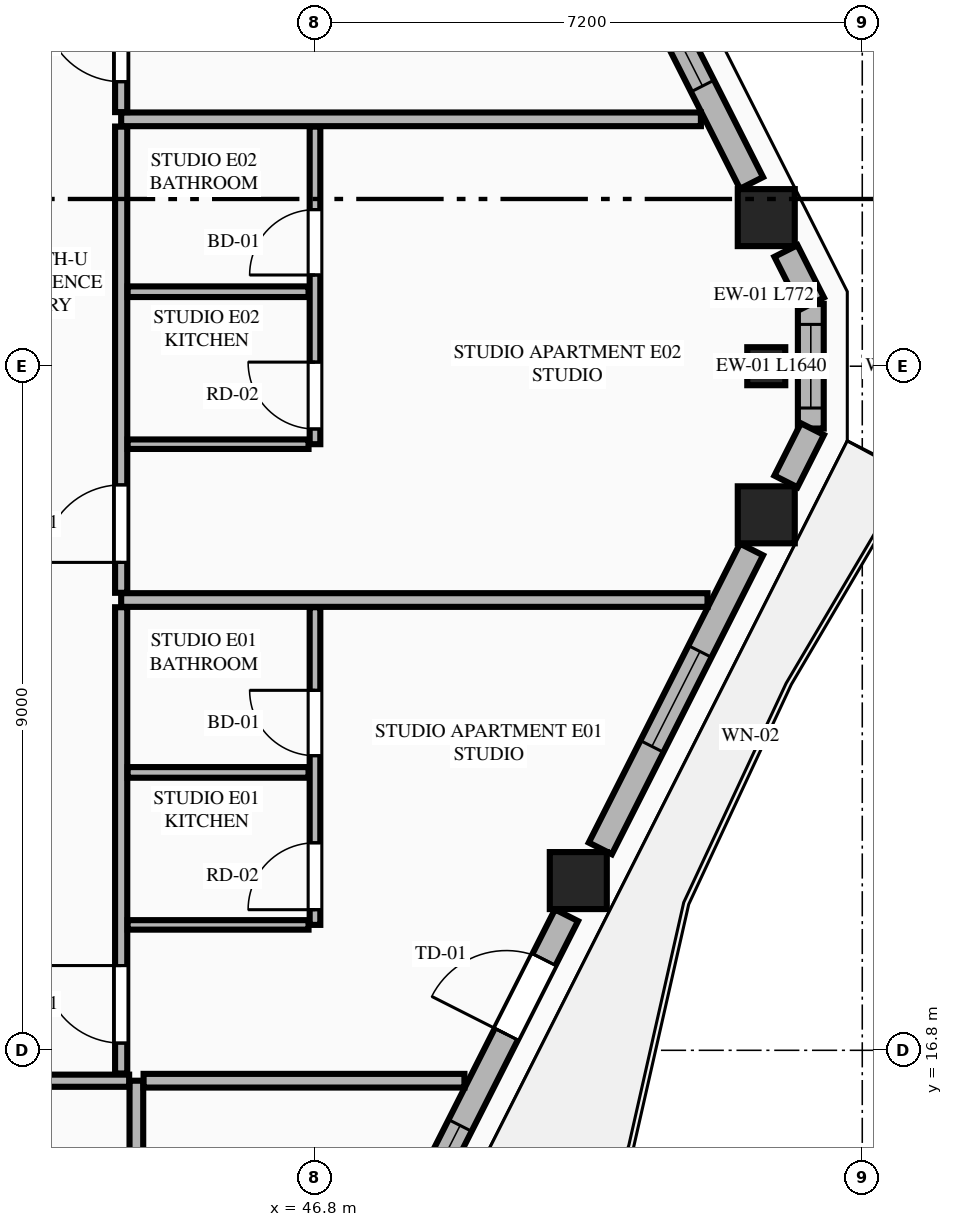
"""IFC4 building model, lengths in metres.
Left out: names, types, materials, properties, quantities, classifications, styles, units other than length and angle.
Written with IfcOpenShell. Run it as: python <this file> out.ifc"""

import sys

from ifc_helpers import new_model, si_unit, direction, frame, frame_2d, origin, origin_2d, place, context, subcontext, project, spatial, rectangle, extrude, element, fill, save


model = new_model("IFC4")
c1 = context("Model", 3, precision=1e-05, world=origin(), true_north=direction((0.0, 1.0)))
c2 = subcontext(c1, "Body", "Model", "MODEL_VIEW")
j1 = project(units=[si_unit("LENGTHUNIT", "METRE"), si_unit("PLANEANGLEUNIT", "RADIAN")], contexts=[c1])
p1 = place(None, origin())
s1 = spatial("IfcSite", under=j1, at=p1, CompositionType="ELEMENT")
p2 = place(p1, origin())
s2 = spatial("IfcBuilding", under=s1, at=p2, CompositionType="ELEMENT")
p3 = place(p2, frame((0.0, 0.0, 248.9)))
s3 = spatial("IfcBuildingStorey", under=s2, at=p3, CompositionType="ELEMENT", Elevation=248.9)
for number, where, z_axis, x_axis in (
    (1, (50.264, 19.033, 0.0), (0.0, 0.0, 1.0), (1.0, 0.0, 0.0)),
    (2, (52.737, 23.845, 0.0), (0.0, 0.0, 1.0), (1.0, 0.0, 0.0)),
    (3, (52.737, 27.755, 0.0), (0.0, 0.0, 1.0), (1.0, 0.0, 0.0)),
):
    element("IfcColumn", number, at=place(p3, frame(where, z_axis=z_axis, x_axis=x_axis)), inside=s3, PredefinedType="COLUMN", context=c2, shape_type="SweptSolid", body=[
        extrude(rectangle(XDim=0.75, YDim=0.75, at=origin_2d()), origin(), (0.0, 0.0, 1.0), 3.65),
    ])
p4 = place(p3, frame((52.737, 25.8, 0.0), z_axis=(0.0, 0.0, 1.0), x_axis=(0.0, 1.0, 0.0)))
e4 = element("IfcColumn", 4, at=p4, inside=s3, PredefinedType="PILASTER", context=c2, shape_type="SweptSolid", body=[
    extrude(rectangle(XDim=0.5, YDim=0.35, at=origin_2d()), origin(), (0.0, 0.0, 1.0), 3.65),
])
p5 = place(p3, frame((53.323, 24.98, 0.0), z_axis=(0.0, 0.0, 1.0), x_axis=(0.0, 1.0, 0.0)))
e5 = element("IfcWall", 5, at=p5, inside=s3, PredefinedType="STANDARD", context=c2, shape_type="SweptSolid", body=[
    extrude(rectangle(XDim=1.64, YDim=0.34, at=frame_2d((0.82, 0.0))), origin(), (0.0, 0.0, 1.0), 3.45),
])
p6 = place(p5, frame((0.27, 0.0, 0.75)))
e6 = element("IfcOpeningElement", 6, at=p6, cuts=e5, PredefinedType="OPENING", context=c2, shape_type="SweptSolid", body=[
    extrude(rectangle(XDim=1.1, YDim=2.0, at=frame_2d((0.55, 1.0))), frame((0.0, 0.18, 0.0), z_axis=(0.0, -1.0, 0.0), x_axis=(1.0, 0.0, 0.0)), (0.0, 0.0, 1.0), 0.36),
])
p7 = place(p3, frame((48.032, 14.473, 0.0), z_axis=(0.0, 0.0, 1.0), x_axis=(0.451539564999, 0.892251097641, 0.0)))
e7 = element("IfcWall", 7, at=p7, inside=s3, PredefinedType="STANDARD", context=c2, shape_type="SweptSolid", body=[
    extrude(rectangle(XDim=4.6, YDim=0.34, at=frame_2d((2.3, 0.0))), origin(), (0.0, 0.0, 1.0), 2.983),
])
p8 = place(p7, frame((2.846, 0.0, 0.0)))
e8 = element("IfcOpeningElement", 8, at=p8, cuts=e7, PredefinedType="OPENING", context=c2, shape_type="SweptSolid", body=[
    extrude(rectangle(XDim=1.1, YDim=2.25, at=frame_2d((0.55, 1.125))), frame((0.0, 0.18, 0.0), z_axis=(0.0, -1.0, 0.0), x_axis=(1.0, 0.0, 0.0)), (0.0, 0.0, 1.0), 0.36),
])
p9 = place(p7, frame((0.4, 0.0, 0.75)))
e9 = element("IfcOpeningElement", 9, at=p9, cuts=e7, PredefinedType="OPENING", context=c2, shape_type="SweptSolid", body=[
    extrude(rectangle(XDim=1.1, YDim=2.0, at=frame_2d((0.55, 1.0))), frame((0.0, 0.18, 0.0), z_axis=(0.0, -1.0, 0.0), x_axis=(1.0, 0.0, 0.0)), (0.0, 0.0, 1.0), 0.36),
])
p10 = place(p3, frame((50.554, 19.456, 0.0), z_axis=(0.0, 0.0, 1.0), x_axis=(0.45130817501, 0.892368158984, 0.0)))
e10 = element("IfcWall", 10, at=p10, inside=s3, PredefinedType="STANDARD", context=c2, shape_type="SweptSolid", body=[
    extrude(rectangle(XDim=4.407, YDim=0.34, at=frame_2d((2.204, 0.0))), origin(), (0.0, 0.0, 1.0), 2.983),
])
p11 = place(p10, frame((1.504, 0.0, 0.75)))
e11 = element("IfcOpeningElement", 11, at=p11, cuts=e10, PredefinedType="OPENING", context=c2, shape_type="SweptSolid", body=[
    extrude(rectangle(XDim=1.4, YDim=2.05, at=frame_2d((0.7, 1.025))), frame((0.0, 0.18, 0.0), z_axis=(0.0, -1.0, 0.0), x_axis=(1.0, 0.0, 0.0)), (0.0, 0.0, 1.0), 0.36),
])
for number, where, z_axis, x_axis in (
    (12, (52.996, 24.284, 0.0), (0.0, 0.0, 1.0), (0.451, 0.893, 0.0)),
    (13, (53.344, 26.627, 0.0), (0.0, 0.0, 1.0), (-0.451, 0.893, 0.0)),
):
    element("IfcWall", number, at=place(p3, frame(where, z_axis=z_axis, x_axis=x_axis)), inside=s3, PredefinedType="STANDARD", context=c2, shape_type="SweptSolid", body=[
        extrude(rectangle(XDim=0.772, YDim=0.34, at=frame_2d((0.386, 0.0))), origin(), (0.0, 0.0, 1.0), 3.45),
    ])
p12 = place(p3, frame((52.543, 28.211, 0.0), z_axis=(0.0, 0.0, 1.0), x_axis=(-0.451285866323, 0.892379441077, 0.0)))
e14 = element("IfcWall", 14, at=p12, inside=s3, PredefinedType="STANDARD", context=c2, shape_type="SweptSolid", body=[
    extrude(rectangle(XDim=4.407, YDim=0.34, at=frame_2d((2.204, 0.0))), origin(), (0.0, 0.0, 1.0), 2.983),
])
p13 = place(p12, frame((1.429, 0.0, 0.75)))
e15 = element("IfcOpeningElement", 15, at=p13, cuts=e14, PredefinedType="OPENING", context=c2, shape_type="SweptSolid", body=[
    extrude(rectangle(XDim=1.55, YDim=2.05, at=frame_2d((0.775, 1.025))), frame((0.0, 0.18, 0.0), z_axis=(0.0, -1.0, 0.0), x_axis=(1.0, 0.0, 0.0)), (0.0, 0.0, 1.0), 0.36),
])
p14 = place(p3, frame((44.45, 8.119, 0.0), z_axis=(0.0, 0.0, 1.0), x_axis=(0.0, 1.0, 0.0)))
e16 = element("IfcWall", 16, at=p14, inside=s3, PredefinedType="PARTITIONING", context=c2, shape_type="SweptSolid", body=[
    extrude(rectangle(XDim=8.281, YDim=0.18, at=frame_2d((4.141, 0.0))), origin(), (0.0, 0.0, 1.0), 3.45),
])
p15 = place(p3, frame((20.445, 16.4, 0.0), z_axis=(0.0, 0.0, 1.0), x_axis=(1.0, 0.0, 0.0)))
e17 = element("IfcWall", 17, at=p15, inside=s3, PredefinedType="PARTITIONING", context=c2, shape_type="SweptSolid", body=[
    extrude(rectangle(XDim=23.91, YDim=0.16, at=frame_2d((11.955, 0.0))), origin(), (0.0, 0.0, 1.0), 3.45),
])
p16 = place(p15, frame((0.705, 0.0, 0.0)))
e18 = element("IfcOpeningElement", 18, at=p16, cuts=e17, PredefinedType="OPENING", context=c2, shape_type="SweptSolid", body=[
    extrude(rectangle(XDim=1.35, YDim=2.35, at=frame_2d((0.675, 1.175))), frame((0.0, 0.09, 0.0), z_axis=(0.0, -1.0, 0.0), x_axis=(1.0, 0.0, 0.0)), (0.0, 0.0, 1.0), 0.18),
])
p17 = place(p3, frame((44.545, 16.4, 0.0), z_axis=(0.0, 0.0, 1.0), x_axis=(1.0, 0.0, 0.0)))
e19 = element("IfcWall", 19, at=p17, inside=s3, PredefinedType="PARTITIONING", context=c2, shape_type="SweptSolid", body=[
    extrude(rectangle(XDim=4.221, YDim=0.18, at=frame_2d((2.111, 0.0))), origin(), (0.0, 0.0, 1.0), 3.45),
])
p18 = place(p3, frame((44.25, 16.495, 0.0), z_axis=(0.0, 0.0, 1.0), x_axis=(0.0, 1.0, 0.0)))
e20 = element("IfcWall", 20, at=p18, inside=s3, PredefinedType="PARTITIONING", context=c2, shape_type="SweptSolid", body=[
    extrude(rectangle(XDim=6.134, YDim=0.16, at=frame_2d((3.067, 0.0))), origin(), (0.0, 0.0, 1.0), 3.137),
])
p19 = place(p18, frame((0.4, 0.0, 0.0)))
e21 = element("IfcOpeningElement", 21, at=p19, cuts=e20, PredefinedType="OPENING", context=c2, shape_type="SweptSolid", body=[
    extrude(rectangle(XDim=1.02, YDim=2.25, at=frame_2d((0.51, 1.125))), frame((0.0, 0.09, 0.0), z_axis=(0.0, -1.0, 0.0), x_axis=(1.0, 0.0, 0.0)), (0.0, 0.0, 1.0), 0.18),
])
p20 = place(p3, frame((44.335, 18.45, 0.0), z_axis=(0.0, 0.0, 1.0), x_axis=(1.0, 0.0, 0.0)))
e22 = element("IfcWall", 22, at=p20, inside=s3, PredefinedType="PARTITIONING", context=c2, shape_type="SweptSolid", body=[
    extrude(rectangle(XDim=2.38, YDim=0.125, at=frame_2d((1.19, 0.0))), origin(), (0.0, 0.0, 1.0), 3.45),
])
p21 = place(p3, frame((46.8, 18.45, 0.0), z_axis=(0.0, 0.0, 1.0), x_axis=(0.0, 1.0, 0.0)))
e23 = element("IfcWall", 23, at=p21, inside=s3, PredefinedType="PLUMBINGWALL", context=c2, shape_type="SweptSolid", body=[
    extrude(rectangle(XDim=4.179, YDim=0.14, at=frame_2d((2.089, 0.0))), origin(), (0.0, 0.0, 1.0), 3.45),
])
p22 = place(p21, frame((2.226, 0.0, 0.0)))
e24 = element("IfcOpeningElement", 24, at=p22, cuts=e23, PredefinedType="OPENING", context=c2, shape_type="SweptSolid", body=[
    extrude(rectangle(XDim=0.86, YDim=2.1, at=frame_2d((0.43, 1.05))), frame((0.0, 0.08, 0.0), z_axis=(0.0, -1.0, 0.0), x_axis=(1.0, 0.0, 0.0)), (0.0, 0.0, 1.0), 0.16),
])
p23 = place(p21, frame((0.2, 0.0, 0.0)))
e25 = element("IfcOpeningElement", 25, at=p23, cuts=e23, PredefinedType="OPENING", context=c2, shape_type="SweptSolid", body=[
    extrude(rectangle(XDim=0.88, YDim=2.15, at=frame_2d((0.44, 1.075))), frame((0.0, 0.08, 0.0), z_axis=(0.0, -1.0, 0.0), x_axis=(1.0, 0.0, 0.0)), (0.0, 0.0, 1.0), 0.16),
])
p24 = place(p3, frame((44.335, 20.456, 0.0), z_axis=(0.0, 0.0, 1.0), x_axis=(1.0, 0.0, 0.0)))
e26 = element("IfcWall", 26, at=p24, inside=s3, PredefinedType="PLUMBINGWALL", context=c2, shape_type="SweptSolid", body=[
    extrude(rectangle(XDim=2.38, YDim=0.14, at=frame_2d((1.19, 0.0))), origin(), (0.0, 0.0, 1.0), 3.45),
])
p25 = place(p3, frame((44.25, 22.724, 0.0), z_axis=(0.0, 0.0, 1.0), x_axis=(1.0, 0.0, 0.0)))
e27 = element("IfcWall", 27, at=p25, inside=s3, PredefinedType="PARTITIONING", context=c2, shape_type="SweptSolid", body=[
    extrude(rectangle(XDim=7.714, YDim=0.18, at=frame_2d((3.857, 0.0))), origin(), (0.0, 0.0, 1.0), 3.45),
])
p26 = place(p3, frame((44.25, 22.819, 0.0), z_axis=(0.0, 0.0, 1.0), x_axis=(0.0, 1.0, 0.0)))
e28 = element("IfcWall", 28, at=p26, inside=s3, PredefinedType="PARTITIONING", context=c2, shape_type="SweptSolid", body=[
    extrude(rectangle(XDim=6.134, YDim=0.16, at=frame_2d((3.067, 0.0))), origin(), (0.0, 0.0, 1.0), 3.137),
])
p27 = place(p26, frame((0.4, 0.0, 0.0)))
e29 = element("IfcOpeningElement", 29, at=p27, cuts=e28, PredefinedType="OPENING", context=c2, shape_type="SweptSolid", body=[
    extrude(rectangle(XDim=1.02, YDim=2.25, at=frame_2d((0.51, 1.125))), frame((0.0, 0.09, 0.0), z_axis=(0.0, -1.0, 0.0), x_axis=(1.0, 0.0, 0.0)), (0.0, 0.0, 1.0), 0.18),
])
p28 = place(p3, frame((44.335, 24.774, 0.0), z_axis=(0.0, 0.0, 1.0), x_axis=(1.0, 0.0, 0.0)))
e30 = element("IfcWall", 30, at=p28, inside=s3, PredefinedType="PARTITIONING", context=c2, shape_type="SweptSolid", body=[
    extrude(rectangle(XDim=2.38, YDim=0.125, at=frame_2d((1.19, 0.0))), origin(), (0.0, 0.0, 1.0), 3.45),
])
p29 = place(p3, frame((46.8, 24.774, 0.0), z_axis=(0.0, 0.0, 1.0), x_axis=(0.0, 1.0, 0.0)))
e31 = element("IfcWall", 31, at=p29, inside=s3, PredefinedType="PLUMBINGWALL", context=c2, shape_type="SweptSolid", body=[
    extrude(rectangle(XDim=4.179, YDim=0.14, at=frame_2d((2.089, 0.0))), origin(), (0.0, 0.0, 1.0), 3.45),
])
p30 = place(p29, frame((2.226, 0.0, 0.0)))
e32 = element("IfcOpeningElement", 32, at=p30, cuts=e31, PredefinedType="OPENING", context=c2, shape_type="SweptSolid", body=[
    extrude(rectangle(XDim=0.86, YDim=2.1, at=frame_2d((0.43, 1.05))), frame((0.0, 0.08, 0.0), z_axis=(0.0, -1.0, 0.0), x_axis=(1.0, 0.0, 0.0)), (0.0, 0.0, 1.0), 0.16),
])
p31 = place(p29, frame((0.2, 0.0, 0.0)))
e33 = element("IfcOpeningElement", 33, at=p31, cuts=e31, PredefinedType="OPENING", context=c2, shape_type="SweptSolid", body=[
    extrude(rectangle(XDim=0.88, YDim=2.15, at=frame_2d((0.44, 1.075))), frame((0.0, 0.08, 0.0), z_axis=(0.0, -1.0, 0.0), x_axis=(1.0, 0.0, 0.0)), (0.0, 0.0, 1.0), 0.16),
])
p32 = place(p3, frame((44.335, 26.78, 0.0), z_axis=(0.0, 0.0, 1.0), x_axis=(1.0, 0.0, 0.0)))
e34 = element("IfcWall", 34, at=p32, inside=s3, PredefinedType="PLUMBINGWALL", context=c2, shape_type="SweptSolid", body=[
    extrude(rectangle(XDim=2.38, YDim=0.14, at=frame_2d((1.19, 0.0))), origin(), (0.0, 0.0, 1.0), 3.45),
])
p33 = place(p3, frame((44.25, 29.048, 0.0), z_axis=(0.0, 0.0, 1.0), x_axis=(1.0, 0.0, 0.0)))
e35 = element("IfcWall", 35, at=p33, inside=s3, PredefinedType="PARTITIONING", context=c2, shape_type="SweptSolid", body=[
    extrude(rectangle(XDim=7.627, YDim=0.18, at=frame_2d((3.813, 0.0))), origin(), (0.0, 0.0, 1.0), 3.45),
])
p34 = place(p3, frame((44.25, 29.143, 0.0), z_axis=(0.0, 0.0, 1.0), x_axis=(0.0, 1.0, 0.0)))
e36 = element("IfcWall", 36, at=p34, inside=s3, PredefinedType="PARTITIONING", context=c2, shape_type="SweptSolid", body=[
    extrude(rectangle(XDim=5.762, YDim=0.16, at=frame_2d((2.881, 0.0))), origin(), (0.0, 0.0, 1.0), 3.137),
])
p35 = place(p34, frame((0.4, 0.0, 0.0)))
e37 = element("IfcOpeningElement", 37, at=p35, cuts=e36, PredefinedType="OPENING", context=c2, shape_type="SweptSolid", body=[
    extrude(rectangle(XDim=1.02, YDim=2.25, at=frame_2d((0.51, 1.125))), frame((0.0, 0.09, 0.0), z_axis=(0.0, -1.0, 0.0), x_axis=(1.0, 0.0, 0.0)), (0.0, 0.0, 1.0), 0.18),
])
p36 = place(p8, origin())
e38 = element("IfcDoor", 38, at=p36, inside=s3, OperationType="SINGLE_SWING_LEFT", PredefinedType="DOOR", context=c2, shape_type="SweptSolid", body=[
    extrude(rectangle(XDim=1.1, YDim=2.25, at=frame_2d((0.55, 1.125))), frame((0.0, 0.025, 0.0), z_axis=(0.0, -1.0, 0.0), x_axis=(1.0, 0.0, 0.0)), (0.0, 0.0, 1.0), 0.05),
])
fill(e8, e38)
p37 = place(p11, origin())
e39 = element("IfcWindow", 39, at=p37, inside=s3, PartitioningType="SINGLE_PANEL", PredefinedType="WINDOW", context=c2, shape_type="SweptSolid", body=[
    extrude(rectangle(XDim=1.4, YDim=2.05, at=frame_2d((0.7, 1.025))), frame((0.0, 0.03, 0.0), z_axis=(0.0, -1.0, 0.0), x_axis=(1.0, 0.0, 0.0)), (0.0, 0.0, 1.0), 0.06),
])
fill(e11, e39)
p38 = place(p13, origin())
e40 = element("IfcWindow", 40, at=p38, inside=s3, PartitioningType="SINGLE_PANEL", PredefinedType="WINDOW", context=c2, shape_type="SweptSolid", body=[
    extrude(rectangle(XDim=1.55, YDim=2.05, at=frame_2d((0.775, 1.025))), frame((0.0, 0.03, 0.0), z_axis=(0.0, -1.0, 0.0), x_axis=(1.0, 0.0, 0.0)), (0.0, 0.0, 1.0), 0.06),
])
fill(e15, e40)
p39 = place(p22, origin())
e41 = element("IfcDoor", 41, at=p39, inside=s3, OperationType="SINGLE_SWING_RIGHT", PredefinedType="DOOR", context=c2, shape_type="SweptSolid", body=[
    extrude(rectangle(XDim=0.86, YDim=2.1, at=frame_2d((0.43, 1.05))), frame((0.0, 0.025, 0.0), z_axis=(0.0, -1.0, 0.0), x_axis=(1.0, 0.0, 0.0)), (0.0, 0.0, 1.0), 0.05),
])
fill(e24, e41)
p40 = place(p19, origin())
e42 = element("IfcDoor", 42, at=p40, inside=s3, OperationType="SINGLE_SWING_RIGHT", PredefinedType="DOOR", context=c2, shape_type="SweptSolid", body=[
    extrude(rectangle(XDim=1.02, YDim=2.25, at=frame_2d((0.51, 1.125))), frame((0.0, 0.025, 0.0), z_axis=(0.0, -1.0, 0.0), x_axis=(1.0, 0.0, 0.0)), (0.0, 0.0, 1.0), 0.05),
])
fill(e21, e42)
p41 = place(p23, origin())
e43 = element("IfcDoor", 43, at=p41, inside=s3, OperationType="SINGLE_SWING_LEFT", PredefinedType="DOOR", context=c2, shape_type="SweptSolid", body=[
    extrude(rectangle(XDim=0.88, YDim=2.15, at=frame_2d((0.44, 1.075))), frame((0.0, 0.025, 0.0), z_axis=(0.0, -1.0, 0.0), x_axis=(1.0, 0.0, 0.0)), (0.0, 0.0, 1.0), 0.05),
])
fill(e25, e43)
p42 = place(p30, origin())
e44 = element("IfcDoor", 44, at=p42, inside=s3, OperationType="SINGLE_SWING_LEFT", PredefinedType="DOOR", context=c2, shape_type="SweptSolid", body=[
    extrude(rectangle(XDim=0.86, YDim=2.1, at=frame_2d((0.43, 1.05))), frame((0.0, 0.025, 0.0), z_axis=(0.0, -1.0, 0.0), x_axis=(1.0, 0.0, 0.0)), (0.0, 0.0, 1.0), 0.05),
])
fill(e32, e44)
p43 = place(p27, origin())
e45 = element("IfcDoor", 45, at=p43, inside=s3, OperationType="SINGLE_SWING_LEFT", PredefinedType="DOOR", context=c2, shape_type="SweptSolid", body=[
    extrude(rectangle(XDim=1.02, YDim=2.25, at=frame_2d((0.51, 1.125))), frame((0.0, 0.025, 0.0), z_axis=(0.0, -1.0, 0.0), x_axis=(1.0, 0.0, 0.0)), (0.0, 0.0, 1.0), 0.05),
])
fill(e29, e45)
p44 = place(p31, origin())
e46 = element("IfcDoor", 46, at=p44, inside=s3, OperationType="SINGLE_SWING_RIGHT", PredefinedType="DOOR", context=c2, shape_type="SweptSolid", body=[
    extrude(rectangle(XDim=0.88, YDim=2.15, at=frame_2d((0.44, 1.075))), frame((0.0, 0.025, 0.0), z_axis=(0.0, -1.0, 0.0), x_axis=(1.0, 0.0, 0.0)), (0.0, 0.0, 1.0), 0.05),
])
fill(e33, e46)
p45 = place(p35, origin())
e47 = element("IfcDoor", 47, at=p45, inside=s3, OperationType="SINGLE_SWING_RIGHT", PredefinedType="DOOR", context=c2, shape_type="SweptSolid", body=[
    extrude(rectangle(XDim=1.02, YDim=2.25, at=frame_2d((0.51, 1.125))), frame((0.0, 0.025, 0.0), z_axis=(0.0, -1.0, 0.0), x_axis=(1.0, 0.0, 0.0)), (0.0, 0.0, 1.0), 0.05),
])
fill(e37, e47)
p46 = place(p9, origin())
e48 = element("IfcWindow", 48, at=p46, inside=s3, PartitioningType="SINGLE_PANEL", PredefinedType="WINDOW", context=c2, shape_type="SweptSolid", body=[
    extrude(rectangle(XDim=1.1, YDim=2.0, at=frame_2d((0.55, 1.0))), frame((0.0, 0.03, 0.0), z_axis=(0.0, -1.0, 0.0), x_axis=(1.0, 0.0, 0.0)), (0.0, 0.0, 1.0), 0.06),
])
fill(e9, e48)
p47 = place(p6, origin())
e49 = element("IfcWindow", 49, at=p47, inside=s3, PartitioningType="SINGLE_PANEL", PredefinedType="WINDOW", context=c2, shape_type="SweptSolid", body=[
    extrude(rectangle(XDim=1.1, YDim=2.0, at=frame_2d((0.55, 1.0))), frame((0.0, 0.03, 0.0), z_axis=(0.0, -1.0, 0.0), x_axis=(1.0, 0.0, 0.0)), (0.0, 0.0, 1.0), 0.06),
])
fill(e6, e49)
save(model, sys.argv[1])
